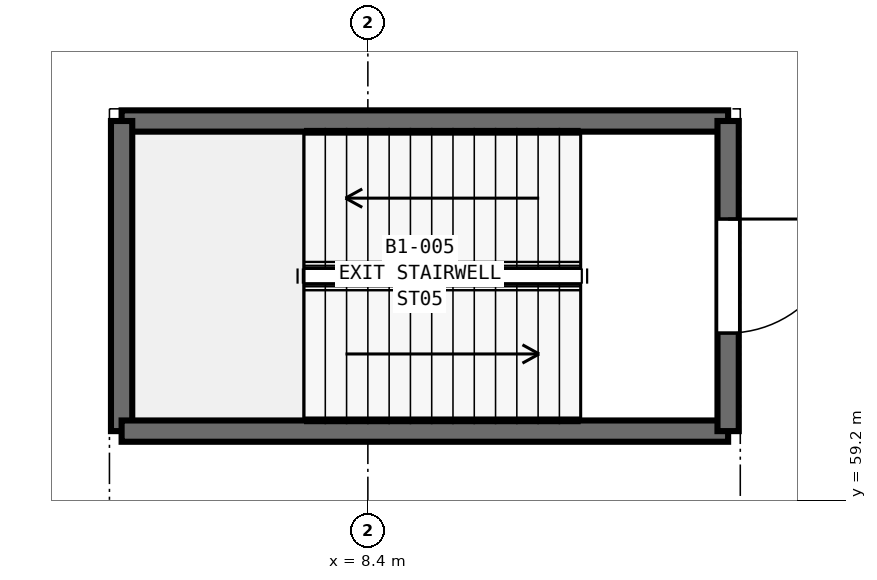
"""IFC4 building model, lengths in metres.
Left out: names, types, materials, properties, quantities, classifications, styles, units other than length and angle.
Written with IfcOpenShell. Run it as: python <this file> out.ifc"""

import sys

from ifc_helpers import new_model, si_unit, direction, frame, frame_2d, origin, place, context, subcontext, project, spatial, rectangle, extrude, element, fill, save


model = new_model("IFC4")
c1 = context("Model", 3, precision=1e-05, world=origin(), true_north=direction((0.0, 1.0)))
c2 = subcontext(c1, "Body", "Model", "MODEL_VIEW")
j1 = project(units=[si_unit("LENGTHUNIT", "METRE"), si_unit("PLANEANGLEUNIT", "RADIAN")], contexts=[c1])
p1 = place(None, origin())
s1 = spatial("IfcSite", under=j1, at=p1, CompositionType="ELEMENT")
p2 = place(p1, origin())
s2 = spatial("IfcBuilding", under=s1, at=p2, CompositionType="ELEMENT")
p3 = place(p2, frame((0.0, 0.0, -4.8)))
s3 = spatial("IfcBuildingStorey", under=s2, at=p3, CompositionType="ELEMENT", Elevation=-4.8)
p4 = place(p3, frame((13.14, 64.19, 0.0), z_axis=(0.0, 0.0, 1.0), x_axis=(-1.0, 0.0, 0.0)))
e1 = element("IfcWall", 1, at=p4, inside=s3, PredefinedType="SHEAR", context=c2, shape_type="SweptSolid", body=[
    extrude(rectangle(XDim=7.98, YDim=0.28, at=frame_2d((3.99, 0.0))), origin(), (0.0, 0.0, 1.0), 4.8),
])
p5 = place(p3, frame((5.16, 64.19, 0.0), z_axis=(0.0, 0.0, 1.0), x_axis=(0.0, -1.0, 0.0)))
e2 = element("IfcWall", 2, at=p5, inside=s3, PredefinedType="SHEAR", context=c2, shape_type="SweptSolid", body=[
    extrude(rectangle(XDim=4.08, YDim=0.28, at=frame_2d((2.04, 0.0))), origin(), (0.0, 0.0, 1.0), 4.8),
])
p6 = place(p3, frame((5.16, 60.11, 0.0), z_axis=(0.0, 0.0, 1.0), x_axis=(1.0, 0.0, 0.0)))
e3 = element("IfcWall", 3, at=p6, inside=s3, PredefinedType="SHEAR", context=c2, shape_type="SweptSolid", body=[
    extrude(rectangle(XDim=7.98, YDim=0.28, at=frame_2d((3.99, 0.0))), origin(), (0.0, 0.0, 1.0), 4.8),
])
p7 = place(p3, frame((13.14, 60.11, 0.0), z_axis=(0.0, 0.0, 1.0), x_axis=(0.0, 1.0, 0.0)))
e4 = element("IfcWall", 4, at=p7, inside=s3, PredefinedType="SHEAR", context=c2, shape_type="SweptSolid", body=[
    extrude(rectangle(XDim=4.08, YDim=0.28, at=frame_2d((2.04, 0.0))), origin(), (0.0, 0.0, 1.0), 4.8),
])
p8 = place(p7, frame((1.29, 0.0, 0.0)))
e5 = element("IfcOpeningElement", 5, at=p8, cuts=e4, PredefinedType="OPENING", context=c2, shape_type="SweptSolid", body=[
    extrude(rectangle(XDim=1.5, YDim=2.2, at=frame_2d((0.75, 1.1))), frame((0.0, 0.15, 0.0), z_axis=(0.0, -1.0, 0.0), x_axis=(1.0, 0.0, 0.0)), (0.0, 0.0, 1.0), 0.3),
])
p9 = place(p8, frame((1.5, 0.0, 0.0), z_axis=(0.0, 0.0, 1.0), x_axis=(-1.0, 0.0, 0.0)))
e6 = element("IfcDoor", 6, at=p9, inside=s3, OperationType="SINGLE_SWING_LEFT", PredefinedType="DOOR", context=c2, shape_type="SweptSolid", body=[
    extrude(rectangle(XDim=1.5, YDim=2.2, at=frame_2d((0.75, 1.1))), frame((0.0, 0.025, 0.0), z_axis=(0.0, -1.0, 0.0), x_axis=(1.0, 0.0, 0.0)), (0.0, 0.0, 1.0), 0.05),
])
fill(e5, e6)
save(model, sys.argv[1])
